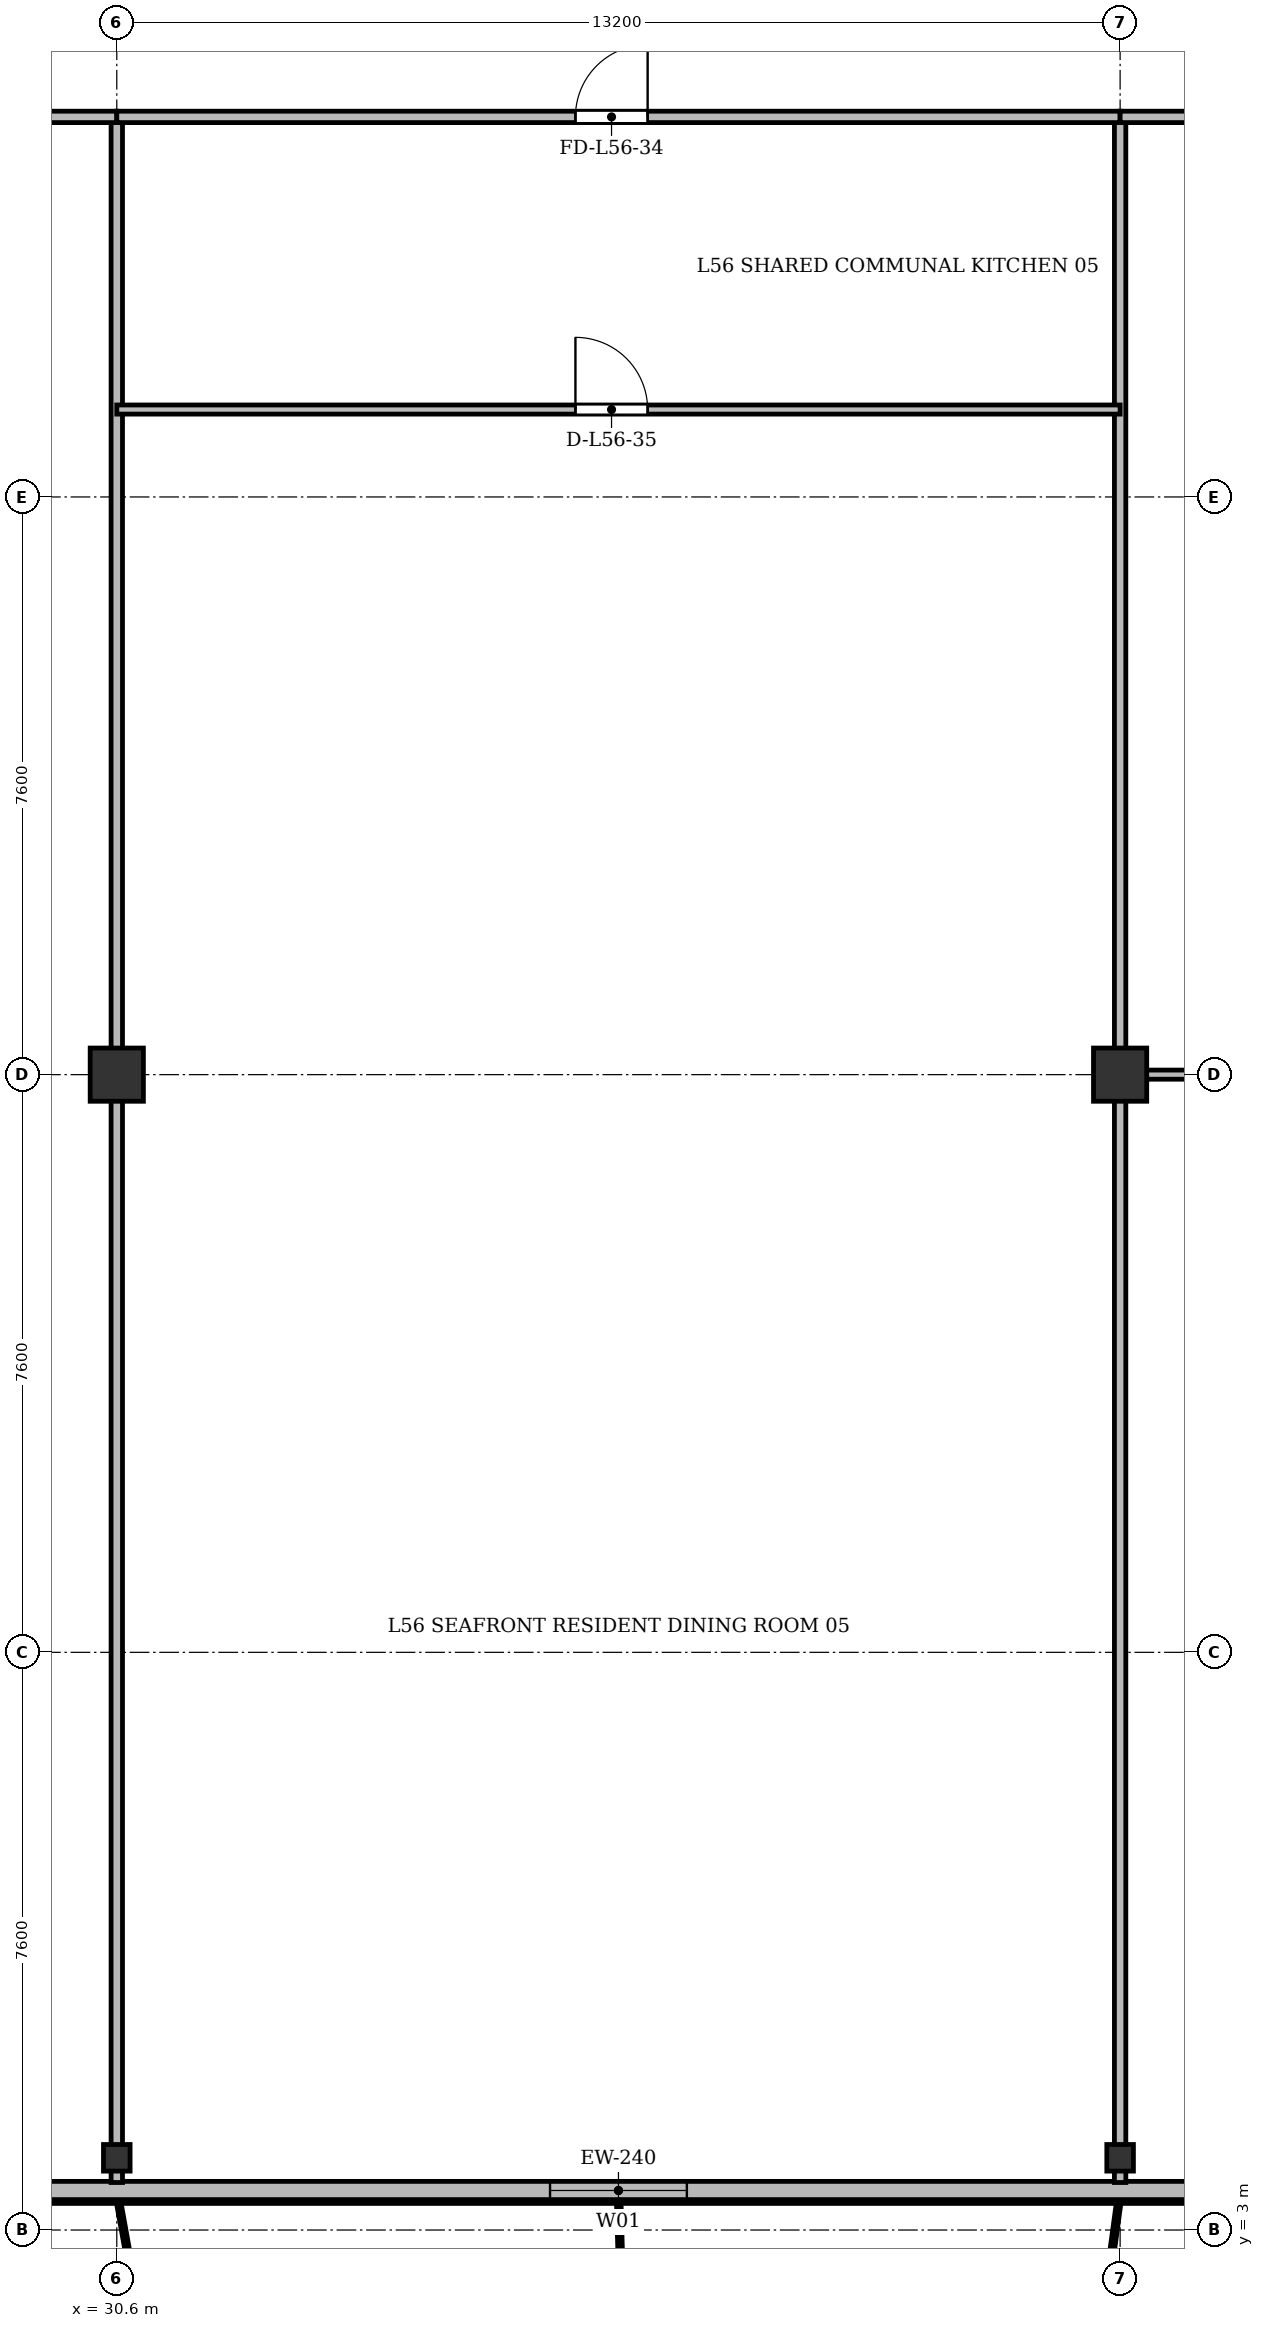
"""IFC4 building model, lengths in metres.
Left out: names, types, materials, properties, quantities, classifications, styles, units other than length and angle.
Written with IfcOpenShell. Run it as: python <this file> out.ifc"""

import sys

from ifc_helpers import new_model, si_unit, direction, frame, frame_2d, origin, origin_2d, place, context, subcontext, project, spatial, rectangle, i_section, extrude, source, transform, mapped, element, fill, save


model = new_model("IFC4")
c1 = context("Model", 3, precision=1e-05, world=origin(), true_north=direction((0.0, 1.0)))
c2 = subcontext(c1, "Body", "Model", "MODEL_VIEW")
j1 = project(units=[si_unit("LENGTHUNIT", "METRE"), si_unit("PLANEANGLEUNIT", "RADIAN")], contexts=[c1])
p1 = place(None, origin())
s1 = spatial("IfcSite", under=j1, at=p1, CompositionType="ELEMENT")
p2 = place(p1, origin())
s2 = spatial("IfcBuilding", under=s1, at=p2, CompositionType="ELEMENT")
p3 = place(p2, frame((0.0, 0.0, 215.7)))
s3 = spatial("IfcBuildingStorey", under=s2, at=p3, CompositionType="ELEMENT", Elevation=215.7)
m1 = source(origin(), c2, "Body", "SweptSolid", [
    extrude(i_section(OverallWidth=0.35, OverallDepth=0.35, WebThickness=0.018, FlangeThickness=0.028, at=origin_2d()), origin(), (0.0, 0.0, 1.0), 3.6),
])
p4 = place(p3, frame((30.6, 3.95, 0.0), z_axis=(0.0, 0.0, 1.0), x_axis=(1.0, 0.0, 0.0)))
e1 = element("IfcColumn", 1, at=p4, inside=s3, PredefinedType="COLUMN", context=c2, shape_type="MappedRepresentation", body=[
    mapped(m1, transform((0.0, 0.0, 0.0), x_axis=(1.0, 0.0, 0.0), y_axis=(0.0, 1.0, 0.0), z_axis=(0.0, 0.0, 1.0), scale=1.0)),
])
m2 = source(origin(), c2, "Body", "SweptSolid", [
    extrude(rectangle(XDim=0.7, YDim=0.7, at=origin_2d()), origin(), (0.0, 0.0, 1.0), 3.6),
])
p5 = place(p3, frame((30.6, 18.2, 0.0), z_axis=(0.0, 0.0, 1.0), x_axis=(1.0, 0.0, 0.0)))
e2 = element("IfcColumn", 2, at=p5, inside=s3, PredefinedType="COLUMN", context=c2, shape_type="MappedRepresentation", body=[
    mapped(m2, transform((0.0, 0.0, 0.0), x_axis=(1.0, 0.0, 0.0), y_axis=(0.0, 1.0, 0.0), z_axis=(0.0, 0.0, 1.0), scale=1.0)),
])
p6 = place(p3, frame((43.8, 3.95, 0.0), z_axis=(0.0, 0.0, 1.0), x_axis=(1.0, 0.0, 0.0)))
e3 = element("IfcColumn", 3, at=p6, inside=s3, PredefinedType="COLUMN", context=c2, shape_type="MappedRepresentation", body=[
    mapped(m1, transform((0.0, 0.0, 0.0), x_axis=(1.0, 0.0, 0.0), y_axis=(0.0, 1.0, 0.0), z_axis=(0.0, 0.0, 1.0), scale=1.0)),
])
p7 = place(p3, frame((43.8, 18.2, 0.0), z_axis=(0.0, 0.0, 1.0), x_axis=(1.0, 0.0, 0.0)))
e4 = element("IfcColumn", 4, at=p7, inside=s3, PredefinedType="COLUMN", context=c2, shape_type="MappedRepresentation", body=[
    mapped(m2, transform((0.0, 0.0, 0.0), x_axis=(1.0, 0.0, 0.0), y_axis=(0.0, 1.0, 0.0), z_axis=(0.0, 0.0, 1.0), scale=1.0)),
])
p8 = place(p3, frame((63.4, 3.52, 0.0), z_axis=(0.0, 0.0, 1.0), x_axis=(-1.0, 0.0, 0.0)))
e5 = element("IfcWall", 5, at=p8, inside=s3, PredefinedType="SOLIDWALL", context=c2, shape_type="SweptSolid", body=[
    extrude(rectangle(XDim=52.4, YDim=0.24, at=frame_2d((26.2, 0.0))), origin(), (0.0, 0.0, 1.0), 3.36),
])
p9 = place(p8, frame((1.245, 0.0, 0.9)))
e6 = element("IfcOpeningElement", 6, at=p9, cuts=e5, PredefinedType="OPENING", context=c2, shape_type="SweptSolid", body=[
    extrude(rectangle(XDim=2.2, YDim=1.8, at=frame_2d((1.1, 0.9))), frame((0.0, 0.13, 0.0), z_axis=(0.0, -1.0, 0.0), x_axis=(1.0, 0.0, 0.0)), (0.0, 0.0, 1.0), 0.26),
])
p10 = place(p8, frame((5.15, 0.0, 0.9)))
e7 = element("IfcOpeningElement", 7, at=p10, cuts=e5, PredefinedType="OPENING", context=c2, shape_type="SweptSolid", body=[
    extrude(rectangle(XDim=1.5, YDim=1.75, at=frame_2d((0.75, 0.875))), frame((0.0, 0.13, 0.0), z_axis=(0.0, -1.0, 0.0), x_axis=(1.0, 0.0, 0.0)), (0.0, 0.0, 1.0), 0.26),
])
p11 = place(p8, frame((7.45, 0.0, 0.9)))
e8 = element("IfcOpeningElement", 8, at=p11, cuts=e5, PredefinedType="OPENING", context=c2, shape_type="SweptSolid", body=[
    extrude(rectangle(XDim=1.5, YDim=1.75, at=frame_2d((0.75, 0.875))), frame((0.0, 0.13, 0.0), z_axis=(0.0, -1.0, 0.0), x_axis=(1.0, 0.0, 0.0)), (0.0, 0.0, 1.0), 0.26),
])
p12 = place(p8, frame((13.575, 0.0, 0.9)))
e9 = element("IfcOpeningElement", 9, at=p12, cuts=e5, PredefinedType="OPENING", context=c2, shape_type="SweptSolid", body=[
    extrude(rectangle(XDim=1.65, YDim=1.85, at=frame_2d((0.825, 0.925))), frame((0.0, 0.13, 0.0), z_axis=(0.0, -1.0, 0.0), x_axis=(1.0, 0.0, 0.0)), (0.0, 0.0, 1.0), 0.26),
])
p13 = place(p8, frame((25.3, 0.0, 0.9)))
e10 = element("IfcOpeningElement", 10, at=p13, cuts=e5, PredefinedType="OPENING", context=c2, shape_type="SweptSolid", body=[
    extrude(rectangle(XDim=1.8, YDim=1.8, at=frame_2d((0.9, 0.9))), frame((0.0, 0.13, 0.0), z_axis=(0.0, -1.0, 0.0), x_axis=(1.0, 0.0, 0.0)), (0.0, 0.0, 1.0), 0.26),
])
p14 = place(p8, frame((36.9, 0.0, 0.9)))
e11 = element("IfcOpeningElement", 11, at=p14, cuts=e5, PredefinedType="OPENING", context=c2, shape_type="SweptSolid", body=[
    extrude(rectangle(XDim=2.2, YDim=1.8, at=frame_2d((1.1, 0.9))), frame((0.0, 0.13, 0.0), z_axis=(0.0, -1.0, 0.0), x_axis=(1.0, 0.0, 0.0)), (0.0, 0.0, 1.0), 0.26),
])
p15 = place(p8, frame((43.45, 0.0, 0.9)))
e12 = element("IfcOpeningElement", 12, at=p15, cuts=e5, PredefinedType="OPENING", context=c2, shape_type="SweptSolid", body=[
    extrude(rectangle(XDim=1.5, YDim=1.75, at=frame_2d((0.75, 0.875))), frame((0.0, 0.13, 0.0), z_axis=(0.0, -1.0, 0.0), x_axis=(1.0, 0.0, 0.0)), (0.0, 0.0, 1.0), 0.26),
])
p16 = place(p8, frame((45.5, 0.0, 0.9)))
e13 = element("IfcOpeningElement", 13, at=p16, cuts=e5, PredefinedType="OPENING", context=c2, shape_type="SweptSolid", body=[
    extrude(rectangle(XDim=2.0, YDim=1.95, at=frame_2d((1.0, 0.975))), frame((0.0, 0.13, 0.0), z_axis=(0.0, -1.0, 0.0), x_axis=(1.0, 0.0, 0.0)), (0.0, 0.0, 1.0), 0.26),
])
p17 = place(p8, frame((49.23, 0.0, 0.9)))
e14 = element("IfcOpeningElement", 14, at=p17, cuts=e5, PredefinedType="OPENING", context=c2, shape_type="SweptSolid", body=[
    extrude(rectangle(XDim=1.65, YDim=1.85, at=frame_2d((0.825, 0.925))), frame((0.0, 0.13, 0.0), z_axis=(0.0, -1.0, 0.0), x_axis=(1.0, 0.0, 0.0)), (0.0, 0.0, 1.0), 0.26),
])
for number, where, z_axis, x_axis in (
    (15, (30.6, 3.625, 0.0), (0.0, 0.0, 1.0), (0.0, 1.0, 0.0)),
    (16, (43.8, 3.625, 0.0), (0.0, 0.0, 1.0), (0.0, 1.0, 0.0)),
):
    element("IfcWall", number, at=place(p3, frame(where, z_axis=z_axis, x_axis=x_axis)), inside=s3, PredefinedType="PARTITIONING", context=c2, shape_type="SweptSolid", body=[
        extrude(rectangle(XDim=27.175, YDim=0.15, at=frame_2d((13.587, 0.0))), origin(), (0.0, 0.0, 1.0), 2.86),
    ])
p18 = place(p3, frame((20.2, 30.8, 0.0), z_axis=(0.0, 0.0, 1.0), x_axis=(1.0, 0.0, 0.0)))
e17 = element("IfcWall", 17, at=p18, inside=s3, PredefinedType="PARTITIONING", context=c2, shape_type="SweptSolid", body=[
    extrude(rectangle(XDim=10.4, YDim=0.15, at=frame_2d((5.2, 0.0))), origin(), (0.0, 0.0, 1.0), 2.86),
])
p19 = place(p18, frame((4.4, 0.0, 0.0)))
e18 = element("IfcOpeningElement", 18, at=p19, cuts=e17, PredefinedType="OPENING", context=c2, shape_type="SweptSolid", body=[
    extrude(rectangle(XDim=1.6, YDim=2.2, at=frame_2d((0.8, 1.1))), frame((0.0, 0.085, 0.0), z_axis=(0.0, -1.0, 0.0), x_axis=(1.0, 0.0, 0.0)), (0.0, 0.0, 1.0), 0.17),
])
p20 = place(p3, frame((30.6, 30.8, 0.0), z_axis=(0.0, 0.0, 1.0), x_axis=(1.0, 0.0, 0.0)))
e19 = element("IfcWall", 19, at=p20, inside=s3, PredefinedType="PARTITIONING", context=c2, shape_type="SweptSolid", body=[
    extrude(rectangle(XDim=13.2, YDim=0.15, at=frame_2d((6.6, 0.0))), origin(), (0.0, 0.0, 1.0), 2.86),
])
p21 = place(p20, frame((6.034, 0.0, 0.0)))
e20 = element("IfcOpeningElement", 20, at=p21, cuts=e19, PredefinedType="OPENING", context=c2, shape_type="SweptSolid", body=[
    extrude(rectangle(XDim=0.95, YDim=2.15, at=frame_2d((0.475, 1.075))), frame((0.0, 0.085, 0.0), z_axis=(0.0, -1.0, 0.0), x_axis=(1.0, 0.0, 0.0)), (0.0, 0.0, 1.0), 0.17),
])
p22 = place(p3, frame((30.6, 26.95, 0.0), z_axis=(0.0, 0.0, 1.0), x_axis=(1.0, 0.0, 0.0)))
e21 = element("IfcWall", 21, at=p22, inside=s3, PredefinedType="PARTITIONING", context=c2, shape_type="SweptSolid", body=[
    extrude(rectangle(XDim=13.2, YDim=0.12, at=frame_2d((6.6, 0.0))), origin(), (0.0, 0.0, 1.0), 2.86),
])
p23 = place(p22, frame((6.034, 0.0, 0.0)))
e22 = element("IfcOpeningElement", 22, at=p23, cuts=e21, PredefinedType="OPENING", context=c2, shape_type="SweptSolid", body=[
    extrude(rectangle(XDim=0.95, YDim=2.15, at=frame_2d((0.475, 1.075))), frame((0.0, 0.07, 0.0), z_axis=(0.0, -1.0, 0.0), x_axis=(1.0, 0.0, 0.0)), (0.0, 0.0, 1.0), 0.14),
])
p24 = place(p3, frame((43.8, 30.8, 0.0), z_axis=(0.0, 0.0, 1.0), x_axis=(1.0, 0.0, 0.0)))
e23 = element("IfcWall", 23, at=p24, inside=s3, PredefinedType="PARTITIONING", context=c2, shape_type="SweptSolid", body=[
    extrude(rectangle(XDim=10.4, YDim=0.15, at=frame_2d((5.2, 0.0))), origin(), (0.0, 0.0, 1.0), 2.86),
])
p25 = place(p24, frame((4.725, 0.0, 0.0)))
e24 = element("IfcOpeningElement", 24, at=p25, cuts=e23, PredefinedType="OPENING", context=c2, shape_type="SweptSolid", body=[
    extrude(rectangle(XDim=0.95, YDim=2.15, at=frame_2d((0.475, 1.075))), frame((0.0, 0.085, 0.0), z_axis=(0.0, -1.0, 0.0), x_axis=(1.0, 0.0, 0.0)), (0.0, 0.0, 1.0), 0.17),
])
p26 = place(p3, frame((43.8, 18.2, 0.0), z_axis=(0.0, 0.0, 1.0), x_axis=(1.0, 0.0, 0.0)))
e25 = element("IfcWall", 25, at=p26, inside=s3, PredefinedType="PARTITIONING", context=c2, shape_type="SweptSolid", body=[
    extrude(rectangle(XDim=10.4, YDim=0.12, at=frame_2d((5.2, 0.0))), origin(), (0.0, 0.0, 1.0), 2.91),
])
p27 = place(p26, frame((4.725, 0.0, 0.0)))
e26 = element("IfcOpeningElement", 26, at=p27, cuts=e25, PredefinedType="OPENING", context=c2, shape_type="SweptSolid", body=[
    extrude(rectangle(XDim=0.95, YDim=2.15, at=frame_2d((0.475, 1.075))), frame((0.0, 0.07, 0.0), z_axis=(0.0, -1.0, 0.0), x_axis=(1.0, 0.0, 0.0)), (0.0, 0.0, 1.0), 0.14),
])
m3 = source(origin(), c2, "Body", "SweptSolid", [
    extrude(rectangle(XDim=1.8, YDim=1.8, at=frame_2d((0.9, 0.9))), frame((0.0, 0.03, 0.0), z_axis=(0.0, -1.0, 0.0), x_axis=(1.0, 0.0, 0.0)), (0.0, 0.0, 1.0), 0.06),
])
p28 = place(p13, origin())
e27 = element("IfcWindow", 27, at=p28, inside=s3, PartitioningType="SINGLE_PANEL", PredefinedType="WINDOW", context=c2, shape_type="MappedRepresentation", body=[
    mapped(m3, transform((0.0, 0.0, 0.0), x_axis=(1.0, 0.0, 0.0), y_axis=(0.0, 1.0, 0.0), z_axis=(0.0, 0.0, 1.0), scale=1.0)),
])
fill(e10, e27)
m4 = source(origin(), c2, "Body", "SweptSolid", [
    extrude(rectangle(XDim=0.95, YDim=2.15, at=frame_2d((0.475, 1.075))), frame((0.0, 0.025, 0.0), z_axis=(0.0, -1.0, 0.0), x_axis=(1.0, 0.0, 0.0)), (0.0, 0.0, 1.0), 0.05),
])
p29 = place(p21, origin())
e28 = element("IfcDoor", 28, at=p29, inside=s3, OperationType="SINGLE_SWING_RIGHT", PredefinedType="DOOR", context=c2, shape_type="MappedRepresentation", body=[
    mapped(m4, transform((0.0, 0.0, 0.0), x_axis=(1.0, 0.0, 0.0), y_axis=(0.0, 1.0, 0.0), z_axis=(0.0, 0.0, 1.0), scale=1.0)),
])
fill(e20, e28)
p30 = place(p23, origin())
e29 = element("IfcDoor", 29, at=p30, inside=s3, OperationType="SINGLE_SWING_LEFT", PredefinedType="DOOR", context=c2, shape_type="MappedRepresentation", body=[
    mapped(m4, transform((0.0, 0.0, 0.0), x_axis=(1.0, 0.0, 0.0), y_axis=(0.0, 1.0, 0.0), z_axis=(0.0, 0.0, 1.0), scale=1.0)),
])
fill(e22, e29)
save(model, sys.argv[1])
